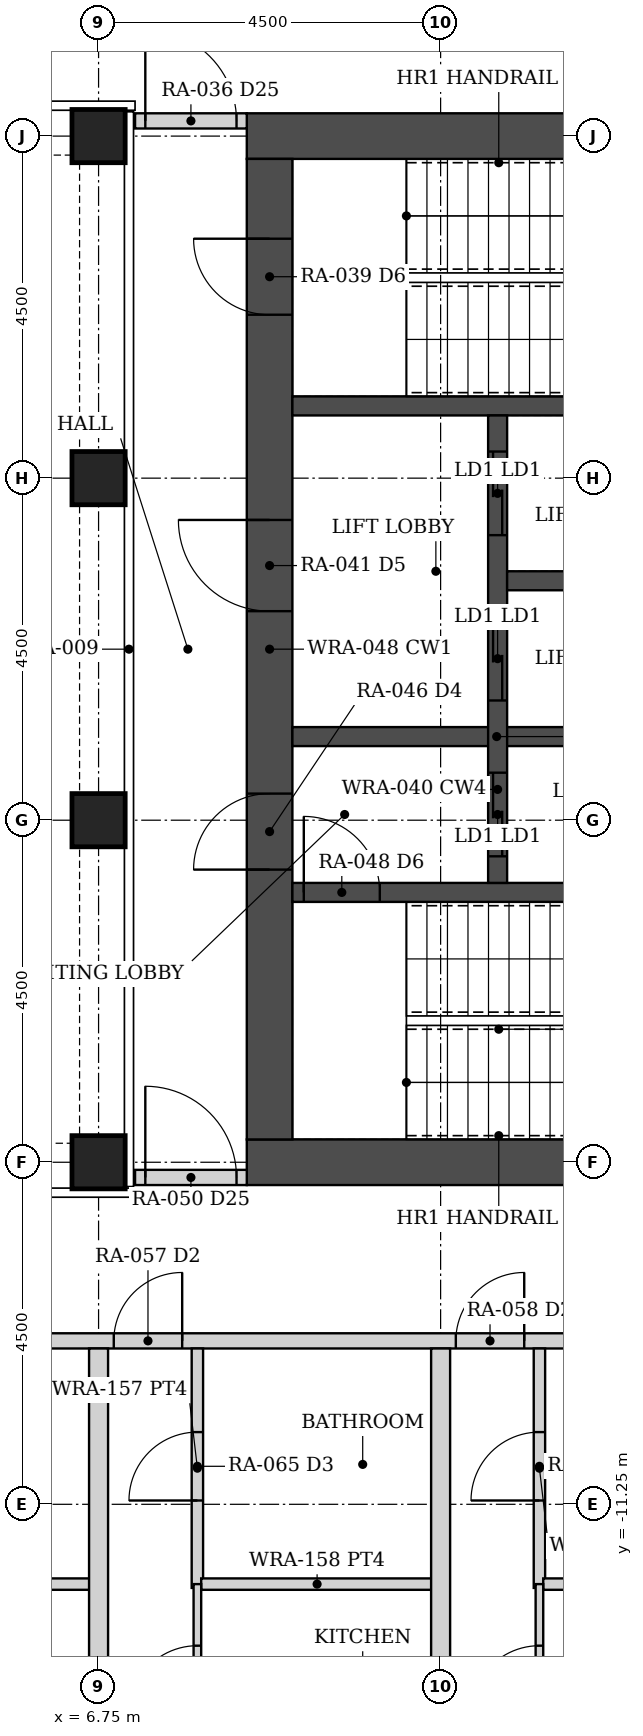
"""IFC4 building model, lengths in metres.
Left out: names, types, materials, properties, quantities, classifications, styles, units other than length and angle.
Written with IfcOpenShell. Run it as: python <this file> out.ifc"""

import sys

from ifc_helpers import new_model, si_unit, direction, frame, frame_2d, origin, origin_2d, place, context, subcontext, project, spatial, rectangle, hollow_rectangle, extrude, element, fill, save


model = new_model("IFC4")
c1 = context("Model", 3, precision=1e-05, world=origin(), true_north=direction((0.0, 1.0)))
c2 = subcontext(c1, "Body", "Model", "MODEL_VIEW")
j1 = project(units=[si_unit("LENGTHUNIT", "METRE"), si_unit("PLANEANGLEUNIT", "RADIAN")], contexts=[c1])
p1 = place(None, origin())
s1 = spatial("IfcSite", under=j1, at=p1, CompositionType="ELEMENT")
p2 = place(p1, origin())
s2 = spatial("IfcBuilding", under=s1, at=p2, CompositionType="ELEMENT")
p3 = place(p2, frame((0.0, 0.0, 26.5)))
s3 = spatial("IfcBuildingStorey", under=s2, at=p3, CompositionType="ELEMENT", Elevation=26.5)
for number, where, z_axis, x_axis in (
    (1, (6.75, -6.75, 0.0), (0.0, 0.0, 1.0), (1.0, 0.0, 0.0)),
    (2, (6.75, -2.25, 0.0), (0.0, 0.0, 1.0), (1.0, 0.0, 0.0)),
    (3, (6.75, 2.25, 0.0), (0.0, 0.0, 1.0), (1.0, 0.0, 0.0)),
    (4, (6.75, 6.75, 0.0), (0.0, 0.0, 1.0), (1.0, 0.0, 0.0)),
):
    element("IfcColumn", number, at=place(p3, frame(where, z_axis=z_axis, x_axis=x_axis)), inside=s3, PredefinedType="COLUMN", context=c2, shape_type="SweptSolid", body=[
        extrude(hollow_rectangle(XDim=0.7, YDim=0.7, WallThickness=0.07, at=origin_2d()), origin(), (0.0, 0.0, 1.0), 3.5),
    ])
for number, where, z_axis, x_axis in (
    (5, (8.7, -6.75, 0.0), (0.0, 0.0, 1.0), (1.0, 0.0, 0.0)),
    (6, (8.7, 6.75, 0.0), (0.0, 0.0, 1.0), (1.0, 0.0, 0.0)),
):
    element("IfcWall", number, at=place(p3, frame(where, z_axis=z_axis, x_axis=x_axis)), inside=s3, PredefinedType="SHEAR", context=c2, shape_type="SweptSolid", body=[
        extrude(rectangle(XDim=9.6, YDim=0.6, at=frame_2d((4.8, 0.0))), origin(), (0.0, 0.0, 1.0), 3.5),
    ])
p4 = place(p3, frame((9.0, -6.45, 0.0), z_axis=(0.0, 0.0, 1.0), x_axis=(0.0, 1.0, 0.0)))
e7 = element("IfcWall", 7, at=p4, inside=s3, PredefinedType="SHEAR", context=c2, shape_type="SweptSolid", body=[
    extrude(rectangle(XDim=12.9, YDim=0.6, at=frame_2d((6.45, 0.0))), origin(), (0.0, 0.0, 1.0), 3.5),
])
p5 = place(p4, frame((3.55, 0.0, 0.0)))
e8 = element("IfcOpeningElement", 8, at=p5, cuts=e7, PredefinedType="OPENING", context=c2, shape_type="SweptSolid", body=[
    extrude(rectangle(XDim=1.0, YDim=2.1, at=frame_2d((0.5, 1.05))), frame((0.0, 0.31, 0.0), z_axis=(0.0, -1.0, 0.0), x_axis=(1.0, 0.0, 0.0)), (0.0, 0.0, 1.0), 0.62),
])
p6 = place(p4, frame((6.95, 0.0, 0.0)))
e9 = element("IfcOpeningElement", 9, at=p6, cuts=e7, PredefinedType="OPENING", context=c2, shape_type="SweptSolid", body=[
    extrude(rectangle(XDim=1.2, YDim=2.1, at=frame_2d((0.6, 1.05))), frame((0.0, 0.31, 0.0), z_axis=(0.0, -1.0, 0.0), x_axis=(1.0, 0.0, 0.0)), (0.0, 0.0, 1.0), 0.62),
])
p7 = place(p4, frame((10.85, 0.0, 0.0)))
e10 = element("IfcOpeningElement", 10, at=p7, cuts=e7, PredefinedType="OPENING", context=c2, shape_type="SweptSolid", body=[
    extrude(rectangle(XDim=1.0, YDim=2.1, at=frame_2d((0.5, 1.05))), frame((0.0, 0.31, 0.0), z_axis=(0.0, -1.0, 0.0), x_axis=(1.0, 0.0, 0.0)), (0.0, 0.0, 1.0), 0.62),
])
p8 = place(p3, frame((9.3, -3.2, 0.0), z_axis=(0.0, 0.0, 1.0), x_axis=(1.0, 0.0, 0.0)))
e11 = element("IfcWall", 11, at=p8, inside=s3, PredefinedType="SHEAR", context=c2, shape_type="SweptSolid", body=[
    extrude(rectangle(XDim=8.4, YDim=0.25, at=frame_2d((4.2, 0.0))), origin(), (0.0, 0.0, 1.0), 3.5),
])
p9 = place(p8, frame((0.15, 0.0, 0.0)))
e12 = element("IfcOpeningElement", 12, at=p9, cuts=e11, PredefinedType="OPENING", context=c2, shape_type="SweptSolid", body=[
    extrude(rectangle(XDim=1.0, YDim=2.1, at=frame_2d((0.5, 1.05))), frame((0.0, 0.135, 0.0), z_axis=(0.0, -1.0, 0.0), x_axis=(1.0, 0.0, 0.0)), (0.0, 0.0, 1.0), 0.27),
])
p10 = place(p3, frame((9.3, 3.2, 0.0), z_axis=(0.0, 0.0, 1.0), x_axis=(1.0, 0.0, 0.0)))
e13 = element("IfcWall", 13, at=p10, inside=s3, PredefinedType="SHEAR", context=c2, shape_type="SweptSolid", body=[
    extrude(rectangle(XDim=8.4, YDim=0.25, at=frame_2d((4.2, 0.0))), origin(), (0.0, 0.0, 1.0), 3.5),
])
p11 = place(p3, frame((9.3, -1.15, 0.0), z_axis=(0.0, 0.0, 1.0), x_axis=(1.0, 0.0, 0.0)))
e14 = element("IfcWall", 14, at=p11, inside=s3, PredefinedType="SHEAR", context=c2, shape_type="SweptSolid", body=[
    extrude(rectangle(XDim=5.375, YDim=0.25, at=frame_2d((2.688, 0.0))), origin(), (0.0, 0.0, 1.0), 3.5),
])
p12 = place(p3, frame((12.0, -3.075, 0.0), z_axis=(0.0, 0.0, 1.0), x_axis=(0.0, 1.0, 0.0)))
e15 = element("IfcWall", 15, at=p12, inside=s3, PredefinedType="SHEAR", context=c2, shape_type="SweptSolid", body=[
    extrude(rectangle(XDim=6.15, YDim=0.25, at=frame_2d((3.075, 0.0))), origin(), (0.0, 0.0, 1.0), 3.5),
])
p13 = place(p12, frame((0.35, 0.0, 0.0)))
e16 = element("IfcOpeningElement", 16, at=p13, cuts=e15, PredefinedType="OPENING", context=c2, shape_type="SweptSolid", body=[
    extrude(rectangle(XDim=1.1, YDim=2.1, at=frame_2d((0.55, 1.05))), frame((0.0, 0.135, 0.0), z_axis=(0.0, -1.0, 0.0), x_axis=(1.0, 0.0, 0.0)), (0.0, 0.0, 1.0), 0.27),
])
p14 = place(p12, frame((2.4, 0.0, 0.0)))
e17 = element("IfcOpeningElement", 17, at=p14, cuts=e15, PredefinedType="OPENING", context=c2, shape_type="SweptSolid", body=[
    extrude(rectangle(XDim=1.1, YDim=2.1, at=frame_2d((0.55, 1.05))), frame((0.0, 0.135, 0.0), z_axis=(0.0, -1.0, 0.0), x_axis=(1.0, 0.0, 0.0)), (0.0, 0.0, 1.0), 0.27),
])
p15 = place(p12, frame((4.575, 0.0, 0.0)))
e18 = element("IfcOpeningElement", 18, at=p15, cuts=e15, PredefinedType="OPENING", context=c2, shape_type="SweptSolid", body=[
    extrude(rectangle(XDim=1.1, YDim=2.1, at=frame_2d((0.55, 1.05))), frame((0.0, 0.135, 0.0), z_axis=(0.0, -1.0, 0.0), x_axis=(1.0, 0.0, 0.0)), (0.0, 0.0, 1.0), 0.27),
])
p16 = place(p3, frame((12.125, 0.9, 0.0), z_axis=(0.0, 0.0, 1.0), x_axis=(1.0, 0.0, 0.0)))
e19 = element("IfcWall", 19, at=p16, inside=s3, PredefinedType="SHEAR", context=c2, shape_type="SweptSolid", body=[
    extrude(rectangle(XDim=2.55, YDim=0.25, at=frame_2d((1.275, 0.0))), origin(), (0.0, 0.0, 1.0), 3.5),
])
p17 = place(p3, frame((7.23, 6.95, 0.0), z_axis=(0.0, 0.0, 1.0), x_axis=(1.0, 0.0, 0.0)))
e20 = element("IfcWall", 20, at=p17, inside=s3, PredefinedType="PARTITIONING", context=c2, shape_type="SweptSolid", body=[
    extrude(rectangle(XDim=1.47, YDim=0.2, at=frame_2d((0.735, 0.0))), origin(), (0.0, 0.0, 1.0), 2.373),
])
p18 = place(p17, frame((0.135, 0.0, 0.0)))
e21 = element("IfcOpeningElement", 21, at=p18, cuts=e20, PredefinedType="OPENING", context=c2, shape_type="SweptSolid", body=[
    extrude(rectangle(XDim=1.2, YDim=2.1, at=frame_2d((0.6, 1.05))), frame((0.0, 0.11, 0.0), z_axis=(0.0, -1.0, 0.0), x_axis=(1.0, 0.0, 0.0)), (0.0, 0.0, 1.0), 0.22),
])
p19 = place(p3, frame((7.23, -6.95, 0.0), z_axis=(0.0, 0.0, 1.0), x_axis=(1.0, 0.0, 0.0)))
e22 = element("IfcWall", 22, at=p19, inside=s3, PredefinedType="PARTITIONING", context=c2, shape_type="SweptSolid", body=[
    extrude(rectangle(XDim=1.47, YDim=0.2, at=frame_2d((0.735, 0.0))), origin(), (0.0, 0.0, 1.0), 2.373),
])
p20 = place(p19, frame((0.135, 0.0, 0.0)))
e23 = element("IfcOpeningElement", 23, at=p20, cuts=e22, PredefinedType="OPENING", context=c2, shape_type="SweptSolid", body=[
    extrude(rectangle(XDim=1.2, YDim=2.1, at=frame_2d((0.6, 1.05))), frame((0.0, 0.11, 0.0), z_axis=(0.0, -1.0, 0.0), x_axis=(1.0, 0.0, 0.0)), (0.0, 0.0, 1.0), 0.22),
])
p21 = place(p3, frame((-24.55, -9.1, 0.0), z_axis=(0.0, 0.0, 1.0), x_axis=(1.0, 0.0, 0.0)))
e24 = element("IfcWall", 24, at=p21, inside=s3, PredefinedType="PARTITIONING", context=c2, shape_type="SweptSolid", body=[
    extrude(rectangle(XDim=49.1, YDim=0.2, at=frame_2d((24.55, 0.0))), origin(), (0.0, 0.0, 1.0), 2.373),
])
p22 = place(p21, frame((5.1, 0.0, 0.0)))
e25 = element("IfcOpeningElement", 25, at=p22, cuts=e24, PredefinedType="OPENING", context=c2, shape_type="SweptSolid", body=[
    extrude(rectangle(XDim=0.9, YDim=2.1, at=frame_2d((0.45, 1.05))), frame((0.0, 0.11, 0.0), z_axis=(0.0, -1.0, 0.0), x_axis=(1.0, 0.0, 0.0)), (0.0, 0.0, 1.0), 0.22),
])
p23 = place(p21, frame((9.0, 0.0, 0.0)))
e26 = element("IfcOpeningElement", 26, at=p23, cuts=e24, PredefinedType="OPENING", context=c2, shape_type="SweptSolid", body=[
    extrude(rectangle(XDim=0.9, YDim=2.1, at=frame_2d((0.45, 1.05))), frame((0.0, 0.11, 0.0), z_axis=(0.0, -1.0, 0.0), x_axis=(1.0, 0.0, 0.0)), (0.0, 0.0, 1.0), 0.22),
])
p24 = place(p21, frame((13.5, 0.0, 0.0)))
e27 = element("IfcOpeningElement", 27, at=p24, cuts=e24, PredefinedType="OPENING", context=c2, shape_type="SweptSolid", body=[
    extrude(rectangle(XDim=0.9, YDim=2.1, at=frame_2d((0.45, 1.05))), frame((0.0, 0.11, 0.0), z_axis=(0.0, -1.0, 0.0), x_axis=(1.0, 0.0, 0.0)), (0.0, 0.0, 1.0), 0.22),
])
p25 = place(p21, frame((18.0, 0.0, 0.0)))
e28 = element("IfcOpeningElement", 28, at=p25, cuts=e24, PredefinedType="OPENING", context=c2, shape_type="SweptSolid", body=[
    extrude(rectangle(XDim=0.9, YDim=2.1, at=frame_2d((0.45, 1.05))), frame((0.0, 0.11, 0.0), z_axis=(0.0, -1.0, 0.0), x_axis=(1.0, 0.0, 0.0)), (0.0, 0.0, 1.0), 0.22),
])
p26 = place(p21, frame((22.5, 0.0, 0.0)))
e29 = element("IfcOpeningElement", 29, at=p26, cuts=e24, PredefinedType="OPENING", context=c2, shape_type="SweptSolid", body=[
    extrude(rectangle(XDim=0.9, YDim=2.1, at=frame_2d((0.45, 1.05))), frame((0.0, 0.11, 0.0), z_axis=(0.0, -1.0, 0.0), x_axis=(1.0, 0.0, 0.0)), (0.0, 0.0, 1.0), 0.22),
])
p27 = place(p21, frame((27.0, 0.0, 0.0)))
e30 = element("IfcOpeningElement", 30, at=p27, cuts=e24, PredefinedType="OPENING", context=c2, shape_type="SweptSolid", body=[
    extrude(rectangle(XDim=0.9, YDim=2.1, at=frame_2d((0.45, 1.05))), frame((0.0, 0.11, 0.0), z_axis=(0.0, -1.0, 0.0), x_axis=(1.0, 0.0, 0.0)), (0.0, 0.0, 1.0), 0.22),
])
p28 = place(p21, frame((31.5, 0.0, 0.0)))
e31 = element("IfcOpeningElement", 31, at=p28, cuts=e24, PredefinedType="OPENING", context=c2, shape_type="SweptSolid", body=[
    extrude(rectangle(XDim=0.9, YDim=2.1, at=frame_2d((0.45, 1.05))), frame((0.0, 0.11, 0.0), z_axis=(0.0, -1.0, 0.0), x_axis=(1.0, 0.0, 0.0)), (0.0, 0.0, 1.0), 0.22),
])
p29 = place(p21, frame((36.0, 0.0, 0.0)))
e32 = element("IfcOpeningElement", 32, at=p29, cuts=e24, PredefinedType="OPENING", context=c2, shape_type="SweptSolid", body=[
    extrude(rectangle(XDim=0.9, YDim=2.1, at=frame_2d((0.45, 1.05))), frame((0.0, 0.11, 0.0), z_axis=(0.0, -1.0, 0.0), x_axis=(1.0, 0.0, 0.0)), (0.0, 0.0, 1.0), 0.22),
])
p30 = place(p21, frame((43.1, 0.0, 0.0)))
e33 = element("IfcOpeningElement", 33, at=p30, cuts=e24, PredefinedType="OPENING", context=c2, shape_type="SweptSolid", body=[
    extrude(rectangle(XDim=0.9, YDim=2.1, at=frame_2d((0.45, 1.05))), frame((0.0, 0.11, 0.0), z_axis=(0.0, -1.0, 0.0), x_axis=(1.0, 0.0, 0.0)), (0.0, 0.0, 1.0), 0.22),
])
p31 = place(p3, frame((3.6, -12.3, 0.0), z_axis=(0.0, 0.0, 1.0), x_axis=(1.0, 0.0, 0.0)))
e34 = element("IfcWall", 34, at=p31, inside=s3, PredefinedType="PARTITIONING", context=c2, shape_type="SweptSolid", body=[
    extrude(rectangle(XDim=3.05, YDim=0.15, at=frame_2d((1.525, 0.0))), origin(), (0.0, 0.0, 1.0), 2.373),
])
p32 = place(p3, frame((8.05, -12.35, 0.0), z_axis=(0.0, 0.0, 1.0), x_axis=(0.0, 1.0, 0.0)))
e35 = element("IfcWall", 35, at=p32, inside=s3, PredefinedType="PARTITIONING", context=c2, shape_type="SweptSolid", body=[
    extrude(rectangle(XDim=3.15, YDim=0.15, at=frame_2d((1.575, 0.0))), origin(), (0.0, 0.0, 1.0), 2.373),
])
p33 = place(p32, frame((1.15, 0.0, 0.0)))
e36 = element("IfcOpeningElement", 36, at=p33, cuts=e35, PredefinedType="OPENING", context=c2, shape_type="SweptSolid", body=[
    extrude(rectangle(XDim=0.9, YDim=2.1, at=frame_2d((0.45, 1.05))), frame((0.0, 0.085, 0.0), z_axis=(0.0, -1.0, 0.0), x_axis=(1.0, 0.0, 0.0)), (0.0, 0.0, 1.0), 0.17),
])
p34 = place(p3, frame((8.1, -12.3, 0.0), z_axis=(0.0, 0.0, 1.0), x_axis=(1.0, 0.0, 0.0)))
e37 = element("IfcWall", 37, at=p34, inside=s3, PredefinedType="PARTITIONING", context=c2, shape_type="SweptSolid", body=[
    extrude(rectangle(XDim=3.05, YDim=0.15, at=frame_2d((1.525, 0.0))), origin(), (0.0, 0.0, 1.0), 2.373),
])
p35 = place(p3, frame((8.05, -14.85, 0.0), z_axis=(0.0, 0.0, 1.0), x_axis=(0.0, 1.0, 0.0)))
e38 = element("IfcWall", 38, at=p35, inside=s3, PredefinedType="PARTITIONING", context=c2, shape_type="SweptSolid", body=[
    extrude(rectangle(XDim=2.55, YDim=0.1, at=frame_2d((1.275, 0.0))), origin(), (0.0, 0.0, 1.0), 2.373),
])
p36 = place(p35, frame((0.84, 0.0, 0.0)))
e39 = element("IfcOpeningElement", 39, at=p36, cuts=e38, PredefinedType="OPENING", context=c2, shape_type="SweptSolid", body=[
    extrude(rectangle(XDim=0.9, YDim=2.1, at=frame_2d((0.45, 1.05))), frame((0.0, 0.06, 0.0), z_axis=(0.0, -1.0, 0.0), x_axis=(1.0, 0.0, 0.0)), (0.0, 0.0, 1.0), 0.12),
])
p37 = place(p3, frame((12.55, -12.35, 0.0), z_axis=(0.0, 0.0, 1.0), x_axis=(0.0, 1.0, 0.0)))
e40 = element("IfcWall", 40, at=p37, inside=s3, PredefinedType="PARTITIONING", context=c2, shape_type="SweptSolid", body=[
    extrude(rectangle(XDim=3.15, YDim=0.15, at=frame_2d((1.575, 0.0))), origin(), (0.0, 0.0, 1.0), 2.373),
])
p38 = place(p37, frame((1.15, 0.0, 0.0)))
e41 = element("IfcOpeningElement", 41, at=p38, cuts=e40, PredefinedType="OPENING", context=c2, shape_type="SweptSolid", body=[
    extrude(rectangle(XDim=0.9, YDim=2.1, at=frame_2d((0.45, 1.05))), frame((0.0, 0.085, 0.0), z_axis=(0.0, -1.0, 0.0), x_axis=(1.0, 0.0, 0.0)), (0.0, 0.0, 1.0), 0.17),
])
p39 = place(p3, frame((12.6, -12.3, 0.0), z_axis=(0.0, 0.0, 1.0), x_axis=(1.0, 0.0, 0.0)))
e42 = element("IfcWall", 42, at=p39, inside=s3, PredefinedType="PARTITIONING", context=c2, shape_type="SweptSolid", body=[
    extrude(rectangle(XDim=3.05, YDim=0.15, at=frame_2d((1.525, 0.0))), origin(), (0.0, 0.0, 1.0), 2.373),
])
p40 = place(p3, frame((12.55, -14.85, 0.0), z_axis=(0.0, 0.0, 1.0), x_axis=(0.0, 1.0, 0.0)))
e43 = element("IfcWall", 43, at=p40, inside=s3, PredefinedType="PARTITIONING", context=c2, shape_type="SweptSolid", body=[
    extrude(rectangle(XDim=2.55, YDim=0.1, at=frame_2d((1.275, 0.0))), origin(), (0.0, 0.0, 1.0), 2.373),
])
p41 = place(p40, frame((0.84, 0.0, 0.0)))
e44 = element("IfcOpeningElement", 44, at=p41, cuts=e43, PredefinedType="OPENING", context=c2, shape_type="SweptSolid", body=[
    extrude(rectangle(XDim=0.9, YDim=2.1, at=frame_2d((0.45, 1.05))), frame((0.0, 0.06, 0.0), z_axis=(0.0, -1.0, 0.0), x_axis=(1.0, 0.0, 0.0)), (0.0, 0.0, 1.0), 0.12),
])
for number, where, z_axis, x_axis in (
    (45, (6.75, -24.35, 0.0), (0.0, 0.0, 1.0), (0.0, 1.0, 0.0)),
    (46, (11.25, -24.35, 0.0), (0.0, 0.0, 1.0), (0.0, 1.0, 0.0)),
):
    element("IfcWall", number, at=place(p3, frame(where, z_axis=z_axis, x_axis=x_axis)), inside=s3, PredefinedType="PARTITIONING", context=c2, shape_type="SweptSolid", body=[
        extrude(rectangle(XDim=15.15, YDim=0.25, at=frame_2d((7.575, 0.0))), origin(), (0.0, 0.0, 1.0), 2.373),
    ])
p42 = place(p18, origin())
e47 = element("IfcDoor", 47, at=p42, inside=s3, OperationType="DOUBLE_DOOR_DOUBLE_SWING", PredefinedType="DOOR", context=c2, shape_type="SweptSolid", body=[
    extrude(rectangle(XDim=1.2, YDim=2.1, at=frame_2d((0.6, 1.05))), frame((0.0, 0.025, 0.0), z_axis=(0.0, -1.0, 0.0), x_axis=(1.0, 0.0, 0.0)), (0.0, 0.0, 1.0), 0.05),
])
fill(e21, e47)
p43 = place(p20, origin())
e48 = element("IfcDoor", 48, at=p43, inside=s3, OperationType="DOUBLE_DOOR_DOUBLE_SWING", PredefinedType="DOOR", context=c2, shape_type="SweptSolid", body=[
    extrude(rectangle(XDim=1.2, YDim=2.1, at=frame_2d((0.6, 1.05))), frame((0.0, 0.025, 0.0), z_axis=(0.0, -1.0, 0.0), x_axis=(1.0, 0.0, 0.0)), (0.0, 0.0, 1.0), 0.05),
])
fill(e23, e48)
p44 = place(p28, origin())
e49 = element("IfcDoor", 49, at=p44, inside=s3, OperationType="SINGLE_SWING_RIGHT", PredefinedType="DOOR", context=c2, shape_type="SweptSolid", body=[
    extrude(rectangle(XDim=0.9, YDim=2.1, at=frame_2d((0.45, 1.05))), frame((0.0, 0.025, 0.0), z_axis=(0.0, -1.0, 0.0), x_axis=(1.0, 0.0, 0.0)), (0.0, 0.0, 1.0), 0.05),
])
fill(e31, e49)
p45 = place(p33, origin())
e50 = element("IfcDoor", 50, at=p45, inside=s3, OperationType="SINGLE_SWING_LEFT", PredefinedType="DOOR", context=c2, shape_type="SweptSolid", body=[
    extrude(rectangle(XDim=0.9, YDim=2.1, at=frame_2d((0.45, 1.05))), frame((0.0, 0.025, 0.0), z_axis=(0.0, -1.0, 0.0), x_axis=(1.0, 0.0, 0.0)), (0.0, 0.0, 1.0), 0.05),
])
fill(e36, e50)
p46 = place(p36, origin())
e51 = element("IfcDoor", 51, at=p46, inside=s3, OperationType="SINGLE_SWING_LEFT", PredefinedType="DOOR", context=c2, shape_type="SweptSolid", body=[
    extrude(rectangle(XDim=0.9, YDim=2.1, at=frame_2d((0.45, 1.05))), frame((0.0, 0.025, 0.0), z_axis=(0.0, -1.0, 0.0), x_axis=(1.0, 0.0, 0.0)), (0.0, 0.0, 1.0), 0.05),
])
fill(e39, e51)
p47 = place(p29, origin())
e52 = element("IfcDoor", 52, at=p47, inside=s3, OperationType="SINGLE_SWING_RIGHT", PredefinedType="DOOR", context=c2, shape_type="SweptSolid", body=[
    extrude(rectangle(XDim=0.9, YDim=2.1, at=frame_2d((0.45, 1.05))), frame((0.0, 0.025, 0.0), z_axis=(0.0, -1.0, 0.0), x_axis=(1.0, 0.0, 0.0)), (0.0, 0.0, 1.0), 0.05),
])
fill(e32, e52)
p48 = place(p38, origin())
e53 = element("IfcDoor", 53, at=p48, inside=s3, OperationType="SINGLE_SWING_LEFT", PredefinedType="DOOR", context=c2, shape_type="SweptSolid", body=[
    extrude(rectangle(XDim=0.9, YDim=2.1, at=frame_2d((0.45, 1.05))), frame((0.0, 0.025, 0.0), z_axis=(0.0, -1.0, 0.0), x_axis=(1.0, 0.0, 0.0)), (0.0, 0.0, 1.0), 0.05),
])
fill(e41, e53)
p49 = place(p41, origin())
e54 = element("IfcDoor", 54, at=p49, inside=s3, OperationType="SINGLE_SWING_LEFT", PredefinedType="DOOR", context=c2, shape_type="SweptSolid", body=[
    extrude(rectangle(XDim=0.9, YDim=2.1, at=frame_2d((0.45, 1.05))), frame((0.0, 0.025, 0.0), z_axis=(0.0, -1.0, 0.0), x_axis=(1.0, 0.0, 0.0)), (0.0, 0.0, 1.0), 0.05),
])
fill(e44, e54)
p50 = place(p5, origin())
e55 = element("IfcDoor", 55, at=p50, inside=s3, OperationType="SINGLE_SWING_LEFT", PredefinedType="DOOR", context=c2, shape_type="SweptSolid", body=[
    extrude(rectangle(XDim=1.0, YDim=2.1, at=frame_2d((0.5, 1.05))), frame((0.0, 0.025, 0.0), z_axis=(0.0, -1.0, 0.0), x_axis=(1.0, 0.0, 0.0)), (0.0, 0.0, 1.0), 0.05),
])
fill(e8, e55)
p51 = place(p9, origin())
e56 = element("IfcDoor", 56, at=p51, inside=s3, OperationType="SINGLE_SWING_LEFT", PredefinedType="DOOR", context=c2, shape_type="SweptSolid", body=[
    extrude(rectangle(XDim=1.0, YDim=2.1, at=frame_2d((0.5, 1.05))), frame((0.0, 0.025, 0.0), z_axis=(0.0, -1.0, 0.0), x_axis=(1.0, 0.0, 0.0)), (0.0, 0.0, 1.0), 0.05),
])
fill(e12, e56)
p52 = place(p6, origin())
e57 = element("IfcDoor", 57, at=p52, inside=s3, OperationType="SINGLE_SWING_RIGHT", PredefinedType="DOOR", context=c2, shape_type="SweptSolid", body=[
    extrude(rectangle(XDim=1.2, YDim=2.1, at=frame_2d((0.6, 1.05))), frame((0.0, 0.025, 0.0), z_axis=(0.0, -1.0, 0.0), x_axis=(1.0, 0.0, 0.0)), (0.0, 0.0, 1.0), 0.05),
])
fill(e9, e57)
p53 = place(p7, origin())
e58 = element("IfcDoor", 58, at=p53, inside=s3, OperationType="SINGLE_SWING_RIGHT", PredefinedType="DOOR", context=c2, shape_type="SweptSolid", body=[
    extrude(rectangle(XDim=1.0, YDim=2.1, at=frame_2d((0.5, 1.05))), frame((0.0, 0.025, 0.0), z_axis=(0.0, -1.0, 0.0), x_axis=(1.0, 0.0, 0.0)), (0.0, 0.0, 1.0), 0.05),
])
fill(e10, e58)
p54 = place(p13, origin())
e59 = element("IfcDoor", 59, at=p54, inside=s3, OperationType="DOUBLE_DOOR_SLIDING", PredefinedType="DOOR", context=c2, shape_type="SweptSolid", body=[
    extrude(rectangle(XDim=1.1, YDim=2.1, at=frame_2d((0.55, 1.05))), frame((0.0, 0.025, 0.0), z_axis=(0.0, -1.0, 0.0), x_axis=(1.0, 0.0, 0.0)), (0.0, 0.0, 1.0), 0.05),
])
fill(e16, e59)
p55 = place(p14, origin())
e60 = element("IfcDoor", 60, at=p55, inside=s3, OperationType="DOUBLE_DOOR_SLIDING", PredefinedType="DOOR", context=c2, shape_type="SweptSolid", body=[
    extrude(rectangle(XDim=1.1, YDim=2.1, at=frame_2d((0.55, 1.05))), frame((0.0, 0.025, 0.0), z_axis=(0.0, -1.0, 0.0), x_axis=(1.0, 0.0, 0.0)), (0.0, 0.0, 1.0), 0.05),
])
fill(e17, e60)
p56 = place(p15, origin())
e61 = element("IfcDoor", 61, at=p56, inside=s3, OperationType="DOUBLE_DOOR_SLIDING", PredefinedType="DOOR", context=c2, shape_type="SweptSolid", body=[
    extrude(rectangle(XDim=1.1, YDim=2.1, at=frame_2d((0.55, 1.05))), frame((0.0, 0.025, 0.0), z_axis=(0.0, -1.0, 0.0), x_axis=(1.0, 0.0, 0.0)), (0.0, 0.0, 1.0), 0.05),
])
fill(e18, e61)
save(model, sys.argv[1])
